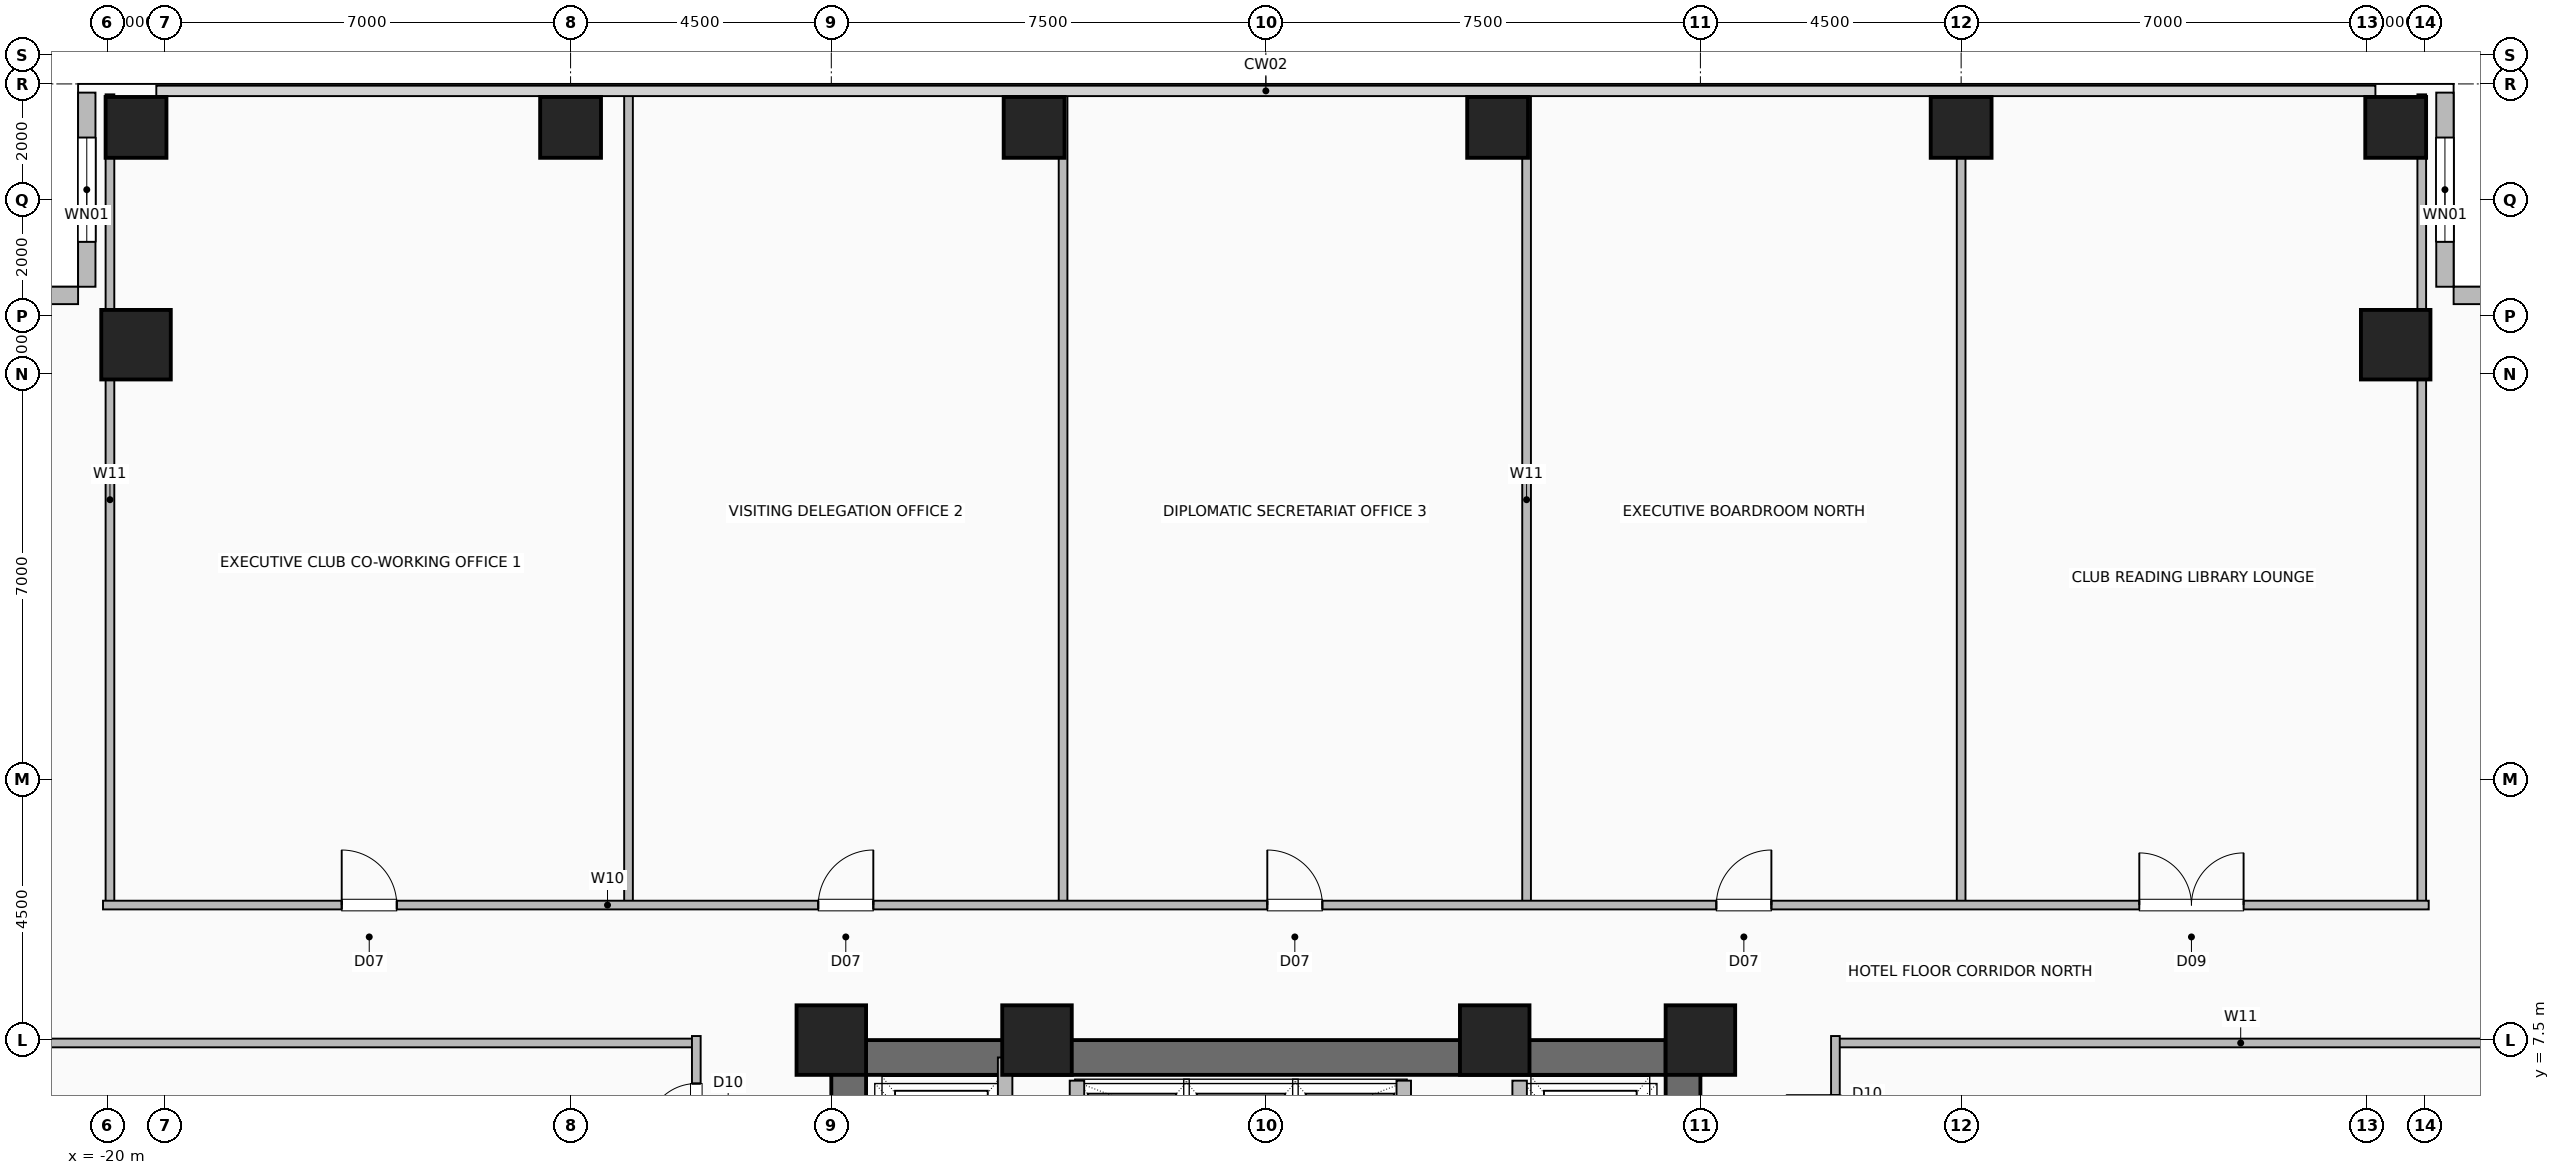
"""IFC4 building model, lengths in metres.
Left out: names, types, materials, properties, quantities, classifications, styles, units other than length and angle.
Written with IfcOpenShell. Run it as: python <this file> out.ifc"""

import sys

from ifc_helpers import new_model, si_unit, direction, frame, frame_2d, origin, origin_2d, place, context, subcontext, project, spatial, rectangle, hollow_rectangle, extrude, element, fill, save


model = new_model("IFC4")
c1 = context("Model", 3, precision=1e-05, world=origin(), true_north=direction((0.0, 1.0)))
c2 = subcontext(c1, "Body", "Model", "MODEL_VIEW")
j1 = project(units=[si_unit("LENGTHUNIT", "METRE"), si_unit("PLANEANGLEUNIT", "RADIAN")], contexts=[c1])
p1 = place(None, origin())
s1 = spatial("IfcSite", under=j1, at=p1, CompositionType="ELEMENT")
p2 = place(p1, origin())
s2 = spatial("IfcBuilding", under=s1, at=p2, CompositionType="ELEMENT")
p3 = place(p2, frame((0.0, 0.0, 62.0)))
s3 = spatial("IfcBuildingStorey", under=s2, at=p3, CompositionType="ELEMENT", Elevation=62.0)
for number, where, z_axis, x_axis in (
    (1, (7.5, 7.5, 0.0), (0.0, 0.0, 1.0), (1.0, 0.0, 0.0)),
    (2, (3.95, 7.5, 0.0), (0.0, 0.0, 1.0), (1.0, 0.0, 0.0)),
    (3, (-3.95, 7.5, 0.0), (0.0, 0.0, 1.0), (1.0, 0.0, 0.0)),
    (4, (-7.5, 7.5, 0.0), (0.0, 0.0, 1.0), (1.0, 0.0, 0.0)),
):
    element("IfcColumn", number, at=place(p3, frame(where, z_axis=z_axis, x_axis=x_axis)), inside=s3, PredefinedType="COLUMN", context=c2, shape_type="SweptSolid", body=[
        extrude(hollow_rectangle(XDim=1.2, YDim=1.2, WallThickness=0.055, at=origin_2d()), origin(), (0.0, 0.0, 1.0), 3.5),
    ])
for number, where, z_axis, x_axis in (
    (5, (-19.5, 23.25, 0.0), (0.0, 0.0, 1.0), (1.0, 0.0, 0.0)),
    (6, (-12.0, 23.25, 0.0), (0.0, 0.0, 1.0), (1.0, 0.0, 0.0)),
    (7, (-4.0, 23.25, 0.0), (0.0, 0.0, 1.0), (1.0, 0.0, 0.0)),
    (8, (4.0, 23.25, 0.0), (0.0, 0.0, 1.0), (1.0, 0.0, 0.0)),
    (9, (12.0, 23.25, 0.0), (0.0, 0.0, 1.0), (1.0, 0.0, 0.0)),
    (10, (19.5, 23.25, 0.0), (0.0, 0.0, 1.0), (1.0, 0.0, 0.0)),
):
    element("IfcColumn", number, at=place(p3, frame(where, z_axis=z_axis, x_axis=x_axis)), inside=s3, PredefinedType="COLUMN", context=c2, shape_type="SweptSolid", body=[
        extrude(hollow_rectangle(XDim=1.05, YDim=1.05, WallThickness=0.05, at=origin_2d()), origin(), (0.0, 0.0, 1.0), 3.5),
    ])
for number, where, z_axis, x_axis in (
    (11, (19.5, 19.5, 0.0), (0.0, 0.0, 1.0), (1.0, 0.0, 0.0)),
    (12, (-19.5, 19.5, 0.0), (0.0, 0.0, 1.0), (1.0, 0.0, 0.0)),
):
    element("IfcColumn", number, at=place(p3, frame(where, z_axis=z_axis, x_axis=x_axis)), inside=s3, PredefinedType="COLUMN", context=c2, shape_type="SweptSolid", body=[
        extrude(hollow_rectangle(XDim=1.2, YDim=1.2, WallThickness=0.055, at=origin_2d()), origin(), (0.0, 0.0, 1.0), 3.5),
    ])
p4 = place(p3, frame((20.35, 23.85, 0.0), z_axis=(0.0, 0.0, 1.0), x_axis=(0.0, -1.0, 0.0)))
e13 = element("IfcWall", 13, at=p4, inside=s3, PredefinedType="SOLIDWALL", context=c2, shape_type="SweptSolid", body=[
    extrude(rectangle(XDim=3.35, YDim=0.3, at=frame_2d((1.675, 0.0))), origin(), (0.0, 0.0, 1.0), 3.25),
])
p5 = place(p4, frame((0.775, 0.0, 0.9)))
e14 = element("IfcOpeningElement", 14, at=p5, cuts=e13, PredefinedType="OPENING", context=c2, shape_type="SweptSolid", body=[
    extrude(rectangle(XDim=1.8, YDim=1.8, at=frame_2d((0.9, 0.9))), frame((0.0, 0.16, 0.0), z_axis=(0.0, -1.0, 0.0), x_axis=(1.0, 0.0, 0.0)), (0.0, 0.0, 1.0), 0.32),
])
p6 = place(p3, frame((23.85, 20.35, 0.0), z_axis=(0.0, 0.0, 1.0), x_axis=(-1.0, 0.0, 0.0)))
e15 = element("IfcWall", 15, at=p6, inside=s3, PredefinedType="SOLIDWALL", context=c2, shape_type="SweptSolid", body=[
    extrude(rectangle(XDim=3.35, YDim=0.3, at=frame_2d((1.675, 0.0))), origin(), (0.0, 0.0, 1.0), 3.25),
])
p7 = place(p3, frame((-20.35, 23.85, 0.0), z_axis=(0.0, 0.0, 1.0), x_axis=(0.0, -1.0, 0.0)))
e16 = element("IfcWall", 16, at=p7, inside=s3, PredefinedType="SOLIDWALL", context=c2, shape_type="SweptSolid", body=[
    extrude(rectangle(XDim=3.35, YDim=0.3, at=frame_2d((1.675, 0.0))), origin(), (0.0, 0.0, 1.0), 3.25),
])
p8 = place(p7, frame((0.775, 0.0, 0.9)))
e17 = element("IfcOpeningElement", 17, at=p8, cuts=e16, PredefinedType="OPENING", context=c2, shape_type="SweptSolid", body=[
    extrude(rectangle(XDim=1.8, YDim=1.8, at=frame_2d((0.9, 0.9))), frame((0.0, 0.16, 0.0), z_axis=(0.0, -1.0, 0.0), x_axis=(1.0, 0.0, 0.0)), (0.0, 0.0, 1.0), 0.32),
])
p9 = place(p3, frame((-23.85, 20.35, 0.0), z_axis=(0.0, 0.0, 1.0), x_axis=(1.0, 0.0, 0.0)))
e18 = element("IfcWall", 18, at=p9, inside=s3, PredefinedType="SOLIDWALL", context=c2, shape_type="SweptSolid", body=[
    extrude(rectangle(XDim=3.35, YDim=0.3, at=frame_2d((1.675, 0.0))), origin(), (0.0, 0.0, 1.0), 3.25),
])
p10 = place(p3, frame((-7.5, 7.2, 0.0), z_axis=(0.0, 0.0, 1.0), x_axis=(1.0, 0.0, 0.0)))
e19 = element("IfcWall", 19, at=p10, inside=s3, PredefinedType="SHEAR", context=c2, shape_type="SweptSolid", body=[
    extrude(rectangle(XDim=15.0, YDim=0.6, at=frame_2d((7.5, 0.0))), origin(), (0.0, 0.0, 1.0), 3.25),
])
p11 = place(p3, frame((-7.2, -7.5, 0.0), z_axis=(0.0, 0.0, 1.0), x_axis=(0.0, 1.0, 0.0)))
e20 = element("IfcWall", 20, at=p11, inside=s3, PredefinedType="SHEAR", context=c2, shape_type="SweptSolid", body=[
    extrude(rectangle(XDim=15.0, YDim=0.6, at=frame_2d((7.5, 0.0))), origin(), (0.0, 0.0, 1.0), 3.25),
])
p12 = place(p11, frame((9.5, 0.0, 0.0)))
e21 = element("IfcOpeningElement", 21, at=p12, cuts=e20, PredefinedType="OPENING", context=c2, shape_type="SweptSolid", body=[
    extrude(rectangle(XDim=1.0, YDim=2.08, at=frame_2d((0.5, 1.04))), frame((0.0, 0.31, 0.0), z_axis=(0.0, -1.0, 0.0), x_axis=(1.0, 0.0, 0.0)), (0.0, 0.0, 1.0), 0.62),
])
p13 = place(p3, frame((7.2, -7.5, 0.0), z_axis=(0.0, 0.0, 1.0), x_axis=(0.0, 1.0, 0.0)))
e22 = element("IfcWall", 22, at=p13, inside=s3, PredefinedType="SHEAR", context=c2, shape_type="SweptSolid", body=[
    extrude(rectangle(XDim=15.0, YDim=0.6, at=frame_2d((7.5, 0.0))), origin(), (0.0, 0.0, 1.0), 3.25),
])
for number, where, z_axis, x_axis in (
    (23, (-3.26, 4.58, 0.0), (0.0, 0.0, 1.0), (0.0, 1.0, 0.0)),
    (24, (2.38, 4.58, 0.0), (0.0, 0.0, 1.0), (0.0, 1.0, 0.0)),
):
    element("IfcWall", number, at=place(p3, frame(where, z_axis=z_axis, x_axis=x_axis)), inside=s3, PredefinedType="SHEAR", context=c2, shape_type="SweptSolid", body=[
        extrude(rectangle(XDim=2.22, YDim=0.25, at=frame_2d((1.11, 0.0))), origin(), (0.0, 0.0, 1.0), 3.25),
    ])
p14 = place(p3, frame((-4.5, 4.35, 0.0), z_axis=(0.0, 0.0, 1.0), x_axis=(0.0, 1.0, 0.0)))
e25 = element("IfcWall", 25, at=p14, inside=s3, PredefinedType="SHEAR", context=c2, shape_type="SweptSolid", body=[
    extrude(rectangle(XDim=2.85, YDim=0.25, at=frame_2d((1.425, 0.0))), origin(), (0.0, 0.0, 1.0), 3.25),
])
p15 = place(p3, frame((4.38, 4.3, 0.0), z_axis=(0.0, 0.0, 1.0), x_axis=(0.0, 1.0, 0.0)))
e26 = element("IfcWall", 26, at=p15, inside=s3, PredefinedType="SHEAR", context=c2, shape_type="SweptSolid", body=[
    extrude(rectangle(XDim=2.5, YDim=0.25, at=frame_2d((1.25, 0.0))), origin(), (0.0, 0.0, 1.0), 3.25),
])
p16 = place(p15, frame((0.8, 0.0, 0.0)))
e27 = element("IfcOpeningElement", 27, at=p16, cuts=e26, PredefinedType="OPENING", context=c2, shape_type="SweptSolid", body=[
    extrude(rectangle(XDim=1.2, YDim=2.2, at=frame_2d((0.6, 1.1))), frame((0.0, 0.135, 0.0), z_axis=(0.0, -1.0, 0.0), x_axis=(1.0, 0.0, 0.0)), (0.0, 0.0, 1.0), 0.27),
])
for number, where, z_axis, x_axis in (
    (28, (-19.95, 9.83, 0.0), (0.0, 0.0, 1.0), (0.0, 1.0, 0.0)),
    (29, (-11.0, 9.83, 0.0), (0.0, 0.0, 1.0), (0.0, 1.0, 0.0)),
    (30, (-3.5, 9.83, 0.0), (0.0, 0.0, 1.0), (0.0, 1.0, 0.0)),
    (31, (4.5, 9.83, 0.0), (0.0, 0.0, 1.0), (0.0, 1.0, 0.0)),
    (32, (12.0, 9.83, 0.0), (0.0, 0.0, 1.0), (0.0, 1.0, 0.0)),
    (33, (19.95, 9.83, 0.0), (0.0, 0.0, 1.0), (0.0, 1.0, 0.0)),
):
    element("IfcWall", number, at=place(p3, frame(where, z_axis=z_axis, x_axis=x_axis)), inside=s3, PredefinedType="PARTITIONING", context=c2, shape_type="SweptSolid", body=[
        extrude(rectangle(XDim=13.99, YDim=0.15, at=frame_2d((6.995, 0.0))), origin(), (0.0, 0.0, 1.0), 3.25),
    ])
p17 = place(p3, frame((-20.07, 9.83, 0.0), z_axis=(0.0, 0.0, 1.0), x_axis=(1.0, 0.0, 0.0)))
e34 = element("IfcWall", 34, at=p17, inside=s3, PredefinedType="PARTITIONING", context=c2, shape_type="SweptSolid", body=[
    extrude(rectangle(XDim=40.14, YDim=0.15, at=frame_2d((20.07, 0.0))), origin(), (0.0, 0.0, 1.0), 3.25),
])
p18 = place(p17, frame((4.12, 0.0, 0.0)))
e35 = element("IfcOpeningElement", 35, at=p18, cuts=e34, PredefinedType="OPENING", context=c2, shape_type="SweptSolid", body=[
    extrude(rectangle(XDim=0.95, YDim=2.06, at=frame_2d((0.475, 1.03))), frame((0.0, 0.085, 0.0), z_axis=(0.0, -1.0, 0.0), x_axis=(1.0, 0.0, 0.0)), (0.0, 0.0, 1.0), 0.17),
])
p19 = place(p17, frame((12.345, 0.0, 0.0)))
e36 = element("IfcOpeningElement", 36, at=p19, cuts=e34, PredefinedType="OPENING", context=c2, shape_type="SweptSolid", body=[
    extrude(rectangle(XDim=0.95, YDim=2.06, at=frame_2d((0.475, 1.03))), frame((0.0, 0.085, 0.0), z_axis=(0.0, -1.0, 0.0), x_axis=(1.0, 0.0, 0.0)), (0.0, 0.0, 1.0), 0.17),
])
p20 = place(p17, frame((20.095, 0.0, 0.0)))
e37 = element("IfcOpeningElement", 37, at=p20, cuts=e34, PredefinedType="OPENING", context=c2, shape_type="SweptSolid", body=[
    extrude(rectangle(XDim=0.95, YDim=2.06, at=frame_2d((0.475, 1.03))), frame((0.0, 0.085, 0.0), z_axis=(0.0, -1.0, 0.0), x_axis=(1.0, 0.0, 0.0)), (0.0, 0.0, 1.0), 0.17),
])
p21 = place(p17, frame((27.845, 0.0, 0.0)))
e38 = element("IfcOpeningElement", 38, at=p21, cuts=e34, PredefinedType="OPENING", context=c2, shape_type="SweptSolid", body=[
    extrude(rectangle(XDim=0.95, YDim=2.06, at=frame_2d((0.475, 1.03))), frame((0.0, 0.085, 0.0), z_axis=(0.0, -1.0, 0.0), x_axis=(1.0, 0.0, 0.0)), (0.0, 0.0, 1.0), 0.17),
])
p22 = place(p17, frame((35.145, 0.0, 0.0)))
e39 = element("IfcOpeningElement", 39, at=p22, cuts=e34, PredefinedType="OPENING", context=c2, shape_type="SweptSolid", body=[
    extrude(rectangle(XDim=1.8, YDim=2.08, at=frame_2d((0.9, 1.04))), frame((0.0, 0.085, 0.0), z_axis=(0.0, -1.0, 0.0), x_axis=(1.0, 0.0, 0.0)), (0.0, 0.0, 1.0), 0.17),
])
p23 = place(p3, frame((-23.82, 7.45, 0.0), z_axis=(0.0, 0.0, 1.0), x_axis=(1.0, 0.0, 0.0)))
e40 = element("IfcWall", 40, at=p23, inside=s3, PredefinedType="PARTITIONING", context=c2, shape_type="SweptSolid", body=[
    extrude(rectangle(XDim=13.99, YDim=0.15, at=frame_2d((6.995, 0.0))), origin(), (0.0, 0.0, 1.0), 3.25),
])
p24 = place(p3, frame((-9.83, -7.57, 0.0), z_axis=(0.0, 0.0, 1.0), x_axis=(0.0, 1.0, 0.0)))
e41 = element("IfcWall", 41, at=p24, inside=s3, PredefinedType="PARTITIONING", context=c2, shape_type="SweptSolid", body=[
    extrude(rectangle(XDim=15.14, YDim=0.15, at=frame_2d((7.57, 0.0))), origin(), (0.0, 0.0, 1.0), 3.25),
])
p25 = place(p24, frame((2.62, 0.0, 0.0)))
e42 = element("IfcOpeningElement", 42, at=p25, cuts=e41, PredefinedType="OPENING", context=c2, shape_type="SweptSolid", body=[
    extrude(rectangle(XDim=0.95, YDim=2.06, at=frame_2d((0.475, 1.03))), frame((0.0, 0.085, 0.0), z_axis=(0.0, -1.0, 0.0), x_axis=(1.0, 0.0, 0.0)), (0.0, 0.0, 1.0), 0.17),
])
p26 = place(p24, frame((8.945, 0.0, 0.0)))
e43 = element("IfcOpeningElement", 43, at=p26, cuts=e41, PredefinedType="OPENING", context=c2, shape_type="SweptSolid", body=[
    extrude(rectangle(XDim=0.95, YDim=2.06, at=frame_2d((0.475, 1.03))), frame((0.0, 0.085, 0.0), z_axis=(0.0, -1.0, 0.0), x_axis=(1.0, 0.0, 0.0)), (0.0, 0.0, 1.0), 0.17),
])
p27 = place(p24, frame((13.47, 0.0, 0.0)))
e44 = element("IfcOpeningElement", 44, at=p27, cuts=e41, PredefinedType="OPENING", context=c2, shape_type="SweptSolid", body=[
    extrude(rectangle(XDim=0.85, YDim=2.05, at=frame_2d((0.425, 1.025))), frame((0.0, 0.085, 0.0), z_axis=(0.0, -1.0, 0.0), x_axis=(1.0, 0.0, 0.0)), (0.0, 0.0, 1.0), 0.17),
])
p28 = place(p3, frame((9.83, 7.45, 0.0), z_axis=(0.0, 0.0, 1.0), x_axis=(1.0, 0.0, 0.0)))
e45 = element("IfcWall", 45, at=p28, inside=s3, PredefinedType="PARTITIONING", context=c2, shape_type="SweptSolid", body=[
    extrude(rectangle(XDim=13.99, YDim=0.15, at=frame_2d((6.995, 0.0))), origin(), (0.0, 0.0, 1.0), 3.25),
])
p29 = place(p3, frame((9.83, -7.57, 0.0), z_axis=(0.0, 0.0, 1.0), x_axis=(0.0, 1.0, 0.0)))
e46 = element("IfcWall", 46, at=p29, inside=s3, PredefinedType="PARTITIONING", context=c2, shape_type="SweptSolid", body=[
    extrude(rectangle(XDim=15.14, YDim=0.15, at=frame_2d((7.57, 0.0))), origin(), (0.0, 0.0, 1.0), 3.25),
])
p30 = place(p29, frame((2.62, 0.0, 0.0)))
e47 = element("IfcOpeningElement", 47, at=p30, cuts=e46, PredefinedType="OPENING", context=c2, shape_type="SweptSolid", body=[
    extrude(rectangle(XDim=0.95, YDim=2.06, at=frame_2d((0.475, 1.03))), frame((0.0, 0.085, 0.0), z_axis=(0.0, -1.0, 0.0), x_axis=(1.0, 0.0, 0.0)), (0.0, 0.0, 1.0), 0.17),
])
p31 = place(p29, frame((8.745, 0.0, 0.0)))
e48 = element("IfcOpeningElement", 48, at=p31, cuts=e46, PredefinedType="OPENING", context=c2, shape_type="SweptSolid", body=[
    extrude(rectangle(XDim=0.95, YDim=2.06, at=frame_2d((0.475, 1.03))), frame((0.0, 0.085, 0.0), z_axis=(0.0, -1.0, 0.0), x_axis=(1.0, 0.0, 0.0)), (0.0, 0.0, 1.0), 0.17),
])
p32 = place(p29, frame((13.27, 0.0, 0.0)))
e49 = element("IfcOpeningElement", 49, at=p32, cuts=e46, PredefinedType="OPENING", context=c2, shape_type="SweptSolid", body=[
    extrude(rectangle(XDim=0.85, YDim=2.05, at=frame_2d((0.425, 1.025))), frame((0.0, 0.085, 0.0), z_axis=(0.0, -1.0, 0.0), x_axis=(1.0, 0.0, 0.0)), (0.0, 0.0, 1.0), 0.17),
])
p33 = place(p5, origin())
e50 = element("IfcWindow", 50, at=p33, inside=s3, PartitioningType="SINGLE_PANEL", PredefinedType="WINDOW", context=c2, shape_type="SweptSolid", body=[
    extrude(rectangle(XDim=1.8, YDim=1.8, at=frame_2d((0.9, 0.9))), frame((0.0, 0.03, 0.0), z_axis=(0.0, -1.0, 0.0), x_axis=(1.0, 0.0, 0.0)), (0.0, 0.0, 1.0), 0.06),
])
fill(e14, e50)
p34 = place(p8, origin())
e51 = element("IfcWindow", 51, at=p34, inside=s3, PartitioningType="SINGLE_PANEL", PredefinedType="WINDOW", context=c2, shape_type="SweptSolid", body=[
    extrude(rectangle(XDim=1.8, YDim=1.8, at=frame_2d((0.9, 0.9))), frame((0.0, 0.03, 0.0), z_axis=(0.0, -1.0, 0.0), x_axis=(1.0, 0.0, 0.0)), (0.0, 0.0, 1.0), 0.06),
])
fill(e17, e51)
p35 = place(p18, origin())
e52 = element("IfcDoor", 52, at=p35, inside=s3, OperationType="SINGLE_SWING_LEFT", PredefinedType="DOOR", context=c2, shape_type="SweptSolid", body=[
    extrude(rectangle(XDim=0.95, YDim=2.06, at=frame_2d((0.475, 1.03))), frame((0.0, 0.025, 0.0), z_axis=(0.0, -1.0, 0.0), x_axis=(1.0, 0.0, 0.0)), (0.0, 0.0, 1.0), 0.05),
])
fill(e35, e52)
p36 = place(p19, origin())
e53 = element("IfcDoor", 53, at=p36, inside=s3, OperationType="SINGLE_SWING_RIGHT", PredefinedType="DOOR", context=c2, shape_type="SweptSolid", body=[
    extrude(rectangle(XDim=0.95, YDim=2.06, at=frame_2d((0.475, 1.03))), frame((0.0, 0.025, 0.0), z_axis=(0.0, -1.0, 0.0), x_axis=(1.0, 0.0, 0.0)), (0.0, 0.0, 1.0), 0.05),
])
fill(e36, e53)
p37 = place(p20, origin())
e54 = element("IfcDoor", 54, at=p37, inside=s3, OperationType="SINGLE_SWING_LEFT", PredefinedType="DOOR", context=c2, shape_type="SweptSolid", body=[
    extrude(rectangle(XDim=0.95, YDim=2.06, at=frame_2d((0.475, 1.03))), frame((0.0, 0.025, 0.0), z_axis=(0.0, -1.0, 0.0), x_axis=(1.0, 0.0, 0.0)), (0.0, 0.0, 1.0), 0.05),
])
fill(e37, e54)
p38 = place(p21, origin())
e55 = element("IfcDoor", 55, at=p38, inside=s3, OperationType="SINGLE_SWING_RIGHT", PredefinedType="DOOR", context=c2, shape_type="SweptSolid", body=[
    extrude(rectangle(XDim=0.95, YDim=2.06, at=frame_2d((0.475, 1.03))), frame((0.0, 0.025, 0.0), z_axis=(0.0, -1.0, 0.0), x_axis=(1.0, 0.0, 0.0)), (0.0, 0.0, 1.0), 0.05),
])
fill(e38, e55)
p39 = place(p22, origin())
e56 = element("IfcDoor", 56, at=p39, inside=s3, OperationType="DOUBLE_DOOR_SINGLE_SWING", PredefinedType="DOOR", context=c2, shape_type="SweptSolid", body=[
    extrude(rectangle(XDim=1.8, YDim=2.08, at=frame_2d((0.9, 1.04))), frame((0.0, 0.025, 0.0), z_axis=(0.0, -1.0, 0.0), x_axis=(1.0, 0.0, 0.0)), (0.0, 0.0, 1.0), 0.05),
])
fill(e39, e56)
p40 = place(p27, origin())
e57 = element("IfcDoor", 57, at=p40, inside=s3, OperationType="SINGLE_SWING_LEFT", PredefinedType="DOOR", context=c2, shape_type="SweptSolid", body=[
    extrude(rectangle(XDim=0.85, YDim=2.05, at=frame_2d((0.425, 1.025))), frame((0.0, 0.025, 0.0), z_axis=(0.0, -1.0, 0.0), x_axis=(1.0, 0.0, 0.0)), (0.0, 0.0, 1.0), 0.05),
])
fill(e44, e57)
save(model, sys.argv[1])
